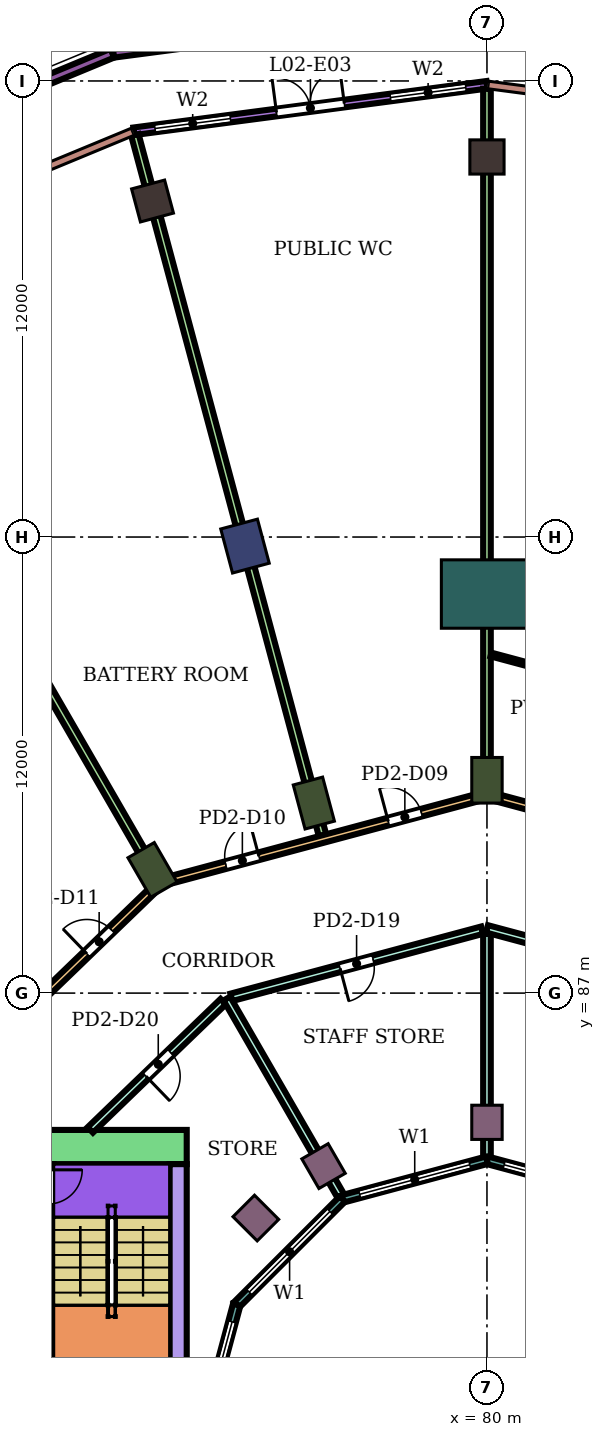
"""IFC4 building model, lengths in metres.
Left out: names, types, materials, properties, quantities, classifications, styles, units other than length and angle.
Written with IfcOpenShell. Run it as: python <this file> out.ifc"""

import sys

from ifc_helpers import new_model, si_unit, direction, frame, frame_2d, origin, origin_2d, place, context, subcontext, project, spatial, rectangle, extrude, element, fill, save


model = new_model("IFC4")
c1 = context("Model", 3, precision=1e-05, world=origin(), true_north=direction((0.0, 1.0)))
c2 = subcontext(c1, "Body", "Model", "MODEL_VIEW")
j1 = project(units=[si_unit("LENGTHUNIT", "METRE"), si_unit("PLANEANGLEUNIT", "RADIAN")], contexts=[c1])
p1 = place(None, origin())
s1 = spatial("IfcSite", under=j1, at=p1, CompositionType="ELEMENT")
p2 = place(p1, origin())
s2 = spatial("IfcBuilding", under=s1, at=p2, CompositionType="ELEMENT")
p3 = place(p2, frame((0.0, 0.0, 12.4)))
s3 = spatial("IfcBuildingStorey", under=s2, at=p3, CompositionType="ELEMENT", Elevation=12.4)
for number, where, z_axis, x_axis in (
    (1, (80.0, 109.0, 0.0), (0.0, 0.0, 1.0), (0.0, 1.0, 0.0)),
    (2, (71.2, 107.842, 0.0), (0.0, 0.0, 1.0), (-0.259, 0.966, 0.0)),
):
    element("IfcColumn", number, at=place(p3, frame(where, z_axis=z_axis, x_axis=x_axis)), inside=s3, PredefinedType="COLUMN", context=c2, shape_type="SweptSolid", body=[
        extrude(rectangle(XDim=0.9, YDim=0.9, at=origin_2d()), origin(), (0.0, 0.0, 1.0), 5.4),
    ])
p4 = place(p3, frame((73.633, 98.762, 0.0), z_axis=(0.0, 0.0, 1.0), x_axis=(-0.258819045103, 0.965925826289, 0.0)))
e3 = element("IfcColumn", 3, at=p4, inside=s3, PredefinedType="COLUMN", context=c2, shape_type="SweptSolid", body=[
    extrude(rectangle(XDim=1.2, YDim=1.0, at=origin_2d()), origin(), (0.0, 0.0, 1.0), 5.4),
])
for number, where, z_axis, x_axis in (
    (4, (80.0, 92.6, 0.0), (0.0, 0.0, 1.0), (0.0, 1.0, 0.0)),
    (5, (75.445, 92.0, 0.0), (0.0, 0.0, 1.0), (-0.259, 0.966, 0.0)),
    (6, (71.2, 90.242, 0.0), (0.0, 0.0, 1.0), (-0.5, 0.866, 0.0)),
):
    element("IfcColumn", number, at=place(p3, frame(where, z_axis=z_axis, x_axis=x_axis)), inside=s3, PredefinedType="COLUMN", context=c2, shape_type="SweptSolid", body=[
        extrude(rectangle(XDim=1.2, YDim=0.8, at=origin_2d()), origin(), (0.0, 0.0, 1.0), 5.4),
    ])
for number, where, z_axis, x_axis in (
    (7, (80.0, 83.6, 0.0), (0.0, 0.0, 1.0), (0.0, 1.0, 0.0)),
    (8, (75.7, 82.448, 0.0), (0.0, 0.0, 1.0), (-0.5, 0.866, 0.0)),
    (9, (73.919, 81.081, 0.0), (0.0, 0.0, 1.0), (-0.707, 0.707, 0.0)),
):
    element("IfcColumn", number, at=place(p3, frame(where, z_axis=z_axis, x_axis=x_axis)), inside=s3, PredefinedType="COLUMN", context=c2, shape_type="SweptSolid", body=[
        extrude(rectangle(XDim=0.9, YDim=0.8, at=origin_2d()), origin(), (0.0, 0.0, 1.0), 5.4),
    ])
p5 = place(p3, frame((80.0, 97.5, 0.0), z_axis=(0.0, 0.0, 1.0), x_axis=(0.0, 1.0, 0.0)))
e10 = element("IfcColumn", 10, at=p5, inside=s3, PredefinedType="COLUMN", context=c2, shape_type="SweptSolid", body=[
    extrude(rectangle(XDim=1.8, YDim=2.4, at=origin_2d()), origin(), (0.0, 0.0, 1.0), 5.4),
])
p6 = place(p3, frame((72.1, 82.95, 0.0), z_axis=(0.0, 0.0, 1.0), x_axis=(-1.0, 0.0, 0.0)))
e11 = element("IfcWall", 11, at=p6, inside=s3, PredefinedType="SHEAR", context=c2, shape_type="SweptSolid", body=[
    extrude(rectangle(XDim=14.6, YDim=0.9, at=frame_2d((7.3, 0.0))), origin(), (0.0, 0.0, 1.0), 4.95),
])
p7 = place(p6, frame((4.2, 0.0, 0.0)))
e12 = element("IfcOpeningElement", 12, at=p7, cuts=e11, PredefinedType="OPENING", context=c2, shape_type="SweptSolid", body=[
    extrude(rectangle(XDim=2.4, YDim=2.4, at=frame_2d((1.2, 1.2))), frame((0.0, 0.46, 0.0), z_axis=(0.0, -1.0, 0.0), x_axis=(1.0, 0.0, 0.0)), (0.0, 0.0, 1.0), 0.92),
])
p8 = place(p3, frame((71.875, 82.5, 0.0), z_axis=(0.0, 0.0, 1.0), x_axis=(0.0, -1.0, 0.0)))
e13 = element("IfcWall", 13, at=p8, inside=s3, PredefinedType="SHEAR", context=c2, shape_type="SweptSolid", body=[
    extrude(rectangle(XDim=7.5, YDim=0.45, at=frame_2d((3.75, 0.0))), origin(), (0.0, 0.0, 1.0), 4.95),
])
p9 = place(p3, frame((68.45, 82.5, 0.0), z_axis=(0.0, 0.0, 1.0), x_axis=(0.0, -1.0, 0.0)))
e14 = element("IfcWall", 14, at=p9, inside=s3, PredefinedType="SHEAR", context=c2, shape_type="SweptSolid", body=[
    extrude(rectangle(XDim=7.5, YDim=0.3, at=frame_2d((3.75, 0.0))), origin(), (0.0, 0.0, 1.0), 4.95),
])
p10 = place(p9, frame((0.15, 0.0, 0.0)))
e15 = element("IfcOpeningElement", 15, at=p10, cuts=e14, PredefinedType="OPENING", context=c2, shape_type="SweptSolid", body=[
    extrude(rectangle(XDim=0.9, YDim=2.1, at=frame_2d((0.45, 1.05))), frame((0.0, 0.16, 0.0), z_axis=(0.0, -1.0, 0.0), x_axis=(1.0, 0.0, 0.0)), (0.0, 0.0, 1.0), 0.32),
])
p11 = place(p3, frame((80.0, 110.899, 0.0), z_axis=(0.0, 0.0, 1.0), x_axis=(-0.99144586971, -0.130518532918, 0.0)))
e16 = element("IfcWall", 16, at=p11, inside=s3, PredefinedType="NOTDEFINED", context=c2, shape_type="SweptSolid", body=[
    extrude(rectangle(XDim=9.371, YDim=0.2, at=frame_2d((4.686, 0.0))), origin(), (0.0, 0.0, 1.0), 5.4),
])
p12 = place(p11, frame((0.562, 0.0, 0.9)))
e17 = element("IfcOpeningElement", 17, at=p12, cuts=e16, PredefinedType="OPENING", context=c2, shape_type="SweptSolid", body=[
    extrude(rectangle(XDim=2.0, YDim=2.4, at=frame_2d((1.0, 1.2))), frame((0.0, 0.11, 0.0), z_axis=(0.0, -1.0, 0.0), x_axis=(1.0, 0.0, 0.0)), (0.0, 0.0, 1.0), 0.22),
])
p13 = place(p11, frame((3.786, 0.0, 0.0)))
e18 = element("IfcOpeningElement", 18, at=p13, cuts=e16, PredefinedType="OPENING", context=c2, shape_type="SweptSolid", body=[
    extrude(rectangle(XDim=1.8, YDim=2.4, at=frame_2d((0.9, 1.2))), frame((0.0, 0.11, 0.0), z_axis=(0.0, -1.0, 0.0), x_axis=(1.0, 0.0, 0.0)), (0.0, 0.0, 1.0), 0.22),
])
p14 = place(p11, frame((6.81, 0.0, 0.9)))
e19 = element("IfcOpeningElement", 19, at=p14, cuts=e16, PredefinedType="OPENING", context=c2, shape_type="SweptSolid", body=[
    extrude(rectangle(XDim=2.0, YDim=2.4, at=frame_2d((1.0, 1.2))), frame((0.0, 0.11, 0.0), z_axis=(0.0, -1.0, 0.0), x_axis=(1.0, 0.0, 0.0)), (0.0, 0.0, 1.0), 0.22),
])
p15 = place(p3, frame((83.802, 81.585, 0.0), z_axis=(0.0, 0.0, 1.0), x_axis=(-0.965933654434, 0.258789828301, 0.0)))
e20 = element("IfcWall", 20, at=p15, inside=s3, PredefinedType="NOTDEFINED", context=c2, shape_type="SweptSolid", body=[
    extrude(rectangle(XDim=3.936, YDim=0.2, at=frame_2d((1.968, 0.0))), origin(), (0.0, 0.0, 1.0), 5.4),
])
p16 = place(p15, frame((0.468, 0.0, 0.9)))
e21 = element("IfcOpeningElement", 21, at=p16, cuts=e20, PredefinedType="OPENING", context=c2, shape_type="SweptSolid", body=[
    extrude(rectangle(XDim=3.0, YDim=2.3, at=frame_2d((1.5, 1.15))), frame((0.0, 0.11, 0.0), z_axis=(0.0, -1.0, 0.0), x_axis=(1.0, 0.0, 0.0)), (0.0, 0.0, 1.0), 0.22),
])
p17 = place(p3, frame((80.0, 82.604, 0.0), z_axis=(0.0, 0.0, 1.0), x_axis=(-0.965933654434, -0.258789828301, 0.0)))
e22 = element("IfcWall", 22, at=p17, inside=s3, PredefinedType="NOTDEFINED", context=c2, shape_type="SweptSolid", body=[
    extrude(rectangle(XDim=3.936, YDim=0.2, at=frame_2d((1.968, 0.0))), origin(), (0.0, 0.0, 1.0), 5.4),
])
p18 = place(p17, frame((0.468, 0.0, 0.9)))
e23 = element("IfcOpeningElement", 23, at=p18, cuts=e22, PredefinedType="OPENING", context=c2, shape_type="SweptSolid", body=[
    extrude(rectangle(XDim=3.0, YDim=2.3, at=frame_2d((1.5, 1.15))), frame((0.0, 0.11, 0.0), z_axis=(0.0, -1.0, 0.0), x_axis=(1.0, 0.0, 0.0)), (0.0, 0.0, 1.0), 0.22),
])
p19 = place(p3, frame((76.198, 81.585, 0.0), z_axis=(0.0, 0.0, 1.0), x_axis=(-0.707106781187, -0.707106781187, 0.0)))
e24 = element("IfcWall", 24, at=p19, inside=s3, PredefinedType="NOTDEFINED", context=c2, shape_type="SweptSolid", body=[
    extrude(rectangle(XDim=3.936, YDim=0.2, at=frame_2d((1.968, 0.0))), origin(), (0.0, 0.0, 1.0), 5.4),
])
p20 = place(p19, frame((0.468, 0.0, 0.9)))
e25 = element("IfcOpeningElement", 25, at=p20, cuts=e24, PredefinedType="OPENING", context=c2, shape_type="SweptSolid", body=[
    extrude(rectangle(XDim=3.0, YDim=2.3, at=frame_2d((1.5, 1.15))), frame((0.0, 0.11, 0.0), z_axis=(0.0, -1.0, 0.0), x_axis=(1.0, 0.0, 0.0)), (0.0, 0.0, 1.0), 0.22),
])
p21 = place(p3, frame((73.415, 78.802, 0.0), z_axis=(0.0, 0.0, 1.0), x_axis=(-0.258789828301, -0.965933654434, 0.0)))
e26 = element("IfcWall", 26, at=p21, inside=s3, PredefinedType="NOTDEFINED", context=c2, shape_type="SweptSolid", body=[
    extrude(rectangle(XDim=3.936, YDim=0.2, at=frame_2d((1.968, 0.0))), origin(), (0.0, 0.0, 1.0), 5.4),
])
p22 = place(p21, frame((0.468, 0.0, 0.9)))
e27 = element("IfcOpeningElement", 27, at=p22, cuts=e26, PredefinedType="OPENING", context=c2, shape_type="SweptSolid", body=[
    extrude(rectangle(XDim=3.0, YDim=2.3, at=frame_2d((1.5, 1.15))), frame((0.0, 0.11, 0.0), z_axis=(0.0, -1.0, 0.0), x_axis=(1.0, 0.0, 0.0)), (0.0, 0.0, 1.0), 0.22),
])
p23 = place(p3, frame((59.664, 110.25, 0.0), z_axis=(0.0, 0.0, 1.0), x_axis=(0.923876443197, 0.382690890544, 0.0)))
e28 = element("IfcWall", 28, at=p23, inside=s3, PredefinedType="PARAPET", context=c2, shape_type="SweptSolid", body=[
    extrude(rectangle(XDim=10.598, YDim=0.2, at=frame_2d((5.299, 0.0))), origin(), (0.0, 0.0, 1.0), 1.1),
])
p24 = place(p3, frame((80.0, 113.032, 0.0), z_axis=(0.0, 0.0, 1.0), x_axis=(0.991442554551, -0.130543713086, 0.0)))
e29 = element("IfcWall", 29, at=p24, inside=s3, PredefinedType="USERDEFINED", context=c2, shape_type="SweptSolid", body=[
    extrude(rectangle(XDim=9.912, YDim=0.25, at=frame_2d((4.956, 0.0))), origin(), (0.0, 0.0, 1.0), 0.6),
])
p25 = place(p3, frame((60.999, 107.943, 0.0), z_axis=(0.0, 0.0, 1.0), x_axis=(0.923880014619, 0.382682268453, 0.0)))
e30 = element("IfcWall", 30, at=p25, inside=s3, PredefinedType="USERDEFINED", context=c2, shape_type="SweptSolid", body=[
    extrude(rectangle(XDim=9.896, YDim=0.25, at=frame_2d((4.948, 0.0))), origin(), (0.0, 0.0, 1.0), 0.6),
])
p26 = place(p3, frame((70.173, 111.739, 0.0), z_axis=(0.0, 0.0, 1.0), x_axis=(0.991440911418, 0.130556191609, 0.0)))
e31 = element("IfcWall", 31, at=p26, inside=s3, PredefinedType="USERDEFINED", context=c2, shape_type="SweptSolid", body=[
    extrude(rectangle(XDim=4.348, YDim=0.25, at=frame_2d((2.174, 0.0))), origin(), (0.0, 0.0, 1.0), 0.6),
])
p27 = place(p3, frame((62.102, 106.003, 0.0), z_axis=(0.0, 0.0, 1.0), x_axis=(0.499973437523, -0.866040739095, 0.0)))
e32 = element("IfcWall", 32, at=p27, inside=s3, PredefinedType="PARTITIONING", context=c2, shape_type="SweptSolid", body=[
    extrude(rectangle(XDim=18.497, YDim=0.2, at=frame_2d((9.248, 0.0))), origin(), (0.0, 0.0, 1.0), 3.75),
])
p28 = place(p3, frame((66.22, 84.9, 0.0), z_axis=(0.0, 0.0, 1.0), x_axis=(0.719621348931, 0.694366700068, 0.0)))
e33 = element("IfcWall", 33, at=p28, inside=s3, PredefinedType="PARTITIONING", context=c2, shape_type="SweptSolid", body=[
    extrude(rectangle(XDim=7.173, YDim=0.2, at=frame_2d((3.586, 0.0))), origin(), (0.0, 0.0, 1.0), 4.45),
])
p29 = place(p28, frame((4.519, 0.0, 0.0)))
e34 = element("IfcOpeningElement", 34, at=p29, cuts=e33, PredefinedType="OPENING", context=c2, shape_type="SweptSolid", body=[
    extrude(rectangle(XDim=0.9, YDim=2.1, at=frame_2d((0.45, 1.05))), frame((0.0, 0.11, 0.0), z_axis=(0.0, -1.0, 0.0), x_axis=(1.0, 0.0, 0.0)), (0.0, 0.0, 1.0), 0.22),
])
p30 = place(p28, frame((0.932, 0.0, 0.0)))
e35 = element("IfcOpeningElement", 35, at=p30, cuts=e33, PredefinedType="OPENING", context=c2, shape_type="SweptSolid", body=[
    extrude(rectangle(XDim=0.9, YDim=2.1, at=frame_2d((0.45, 1.05))), frame((0.0, 0.11, 0.0), z_axis=(0.0, -1.0, 0.0), x_axis=(1.0, 0.0, 0.0)), (0.0, 0.0, 1.0), 0.22),
])
p31 = place(p3, frame((69.563, 83.4, 0.0), z_axis=(0.0, 0.0, 1.0), x_axis=(0.719454254864, 0.694539829785, 0.0)))
e36 = element("IfcWall", 36, at=p31, inside=s3, PredefinedType="PARTITIONING", context=c2, shape_type="SweptSolid", body=[
    extrude(rectangle(XDim=4.86, YDim=0.2, at=frame_2d((2.43, 0.0))), origin(), (0.0, 0.0, 1.0), 4.95),
])
p32 = place(p31, frame((2.035, 0.0, 0.0)))
e37 = element("IfcOpeningElement", 37, at=p32, cuts=e36, PredefinedType="OPENING", context=c2, shape_type="SweptSolid", body=[
    extrude(rectangle(XDim=0.9, YDim=2.1, at=frame_2d((0.45, 1.05))), frame((0.0, 0.11, 0.0), z_axis=(0.0, -1.0, 0.0), x_axis=(1.0, 0.0, 0.0)), (0.0, 0.0, 1.0), 0.22),
])
p33 = place(p3, frame((70.737, 109.579, 0.0), z_axis=(0.0, 0.0, 1.0), x_axis=(0.258776177531, -0.965937311601, 0.0)))
e38 = element("IfcWall", 38, at=p33, inside=s3, PredefinedType="PARTITIONING", context=c2, shape_type="SweptSolid", body=[
    extrude(rectangle(XDim=19.074, YDim=0.2, at=frame_2d((9.537, 0.0))), origin(), (0.0, 0.0, 1.0), 3.75),
])
p34 = place(p3, frame((71.411, 89.908, 0.0), z_axis=(0.0, 0.0, 1.0), x_axis=(0.965907314361, 0.258888122678, 0.0)))
e39 = element("IfcWall", 39, at=p34, inside=s3, PredefinedType="PARTITIONING", context=c2, shape_type="SweptSolid", body=[
    extrude(rectangle(XDim=8.802, YDim=0.2, at=frame_2d((4.401, 0.0))), origin(), (0.0, 0.0, 1.0), 4.45),
])
p35 = place(p34, frame((6.205, 0.0, 0.0)))
e40 = element("IfcOpeningElement", 40, at=p35, cuts=e39, PredefinedType="OPENING", context=c2, shape_type="SweptSolid", body=[
    extrude(rectangle(XDim=0.9, YDim=2.1, at=frame_2d((0.45, 1.05))), frame((0.0, 0.11, 0.0), z_axis=(0.0, -1.0, 0.0), x_axis=(1.0, 0.0, 0.0)), (0.0, 0.0, 1.0), 0.22),
])
p36 = place(p34, frame((1.779, 0.0, 0.0)))
e41 = element("IfcOpeningElement", 41, at=p36, cuts=e39, PredefinedType="OPENING", context=c2, shape_type="SweptSolid", body=[
    extrude(rectangle(XDim=0.9, YDim=2.1, at=frame_2d((0.45, 1.05))), frame((0.0, 0.11, 0.0), z_axis=(0.0, -1.0, 0.0), x_axis=(1.0, 0.0, 0.0)), (0.0, 0.0, 1.0), 0.22),
])
p37 = place(p3, frame((73.274, 86.888, 0.0), z_axis=(0.0, 0.0, 1.0), x_axis=(0.965941353683, 0.258761089124, 0.0)))
e42 = element("IfcWall", 42, at=p37, inside=s3, PredefinedType="PARTITIONING", context=c2, shape_type="SweptSolid", body=[
    extrude(rectangle(XDim=6.833, YDim=0.2, at=frame_2d((3.417, 0.0))), origin(), (0.0, 0.0, 1.0), 4.95),
])
p38 = place(p37, frame((2.961, 0.0, 0.0)))
e43 = element("IfcOpeningElement", 43, at=p38, cuts=e42, PredefinedType="OPENING", context=c2, shape_type="SweptSolid", body=[
    extrude(rectangle(XDim=0.9, YDim=2.1, at=frame_2d((0.45, 1.05))), frame((0.0, 0.11, 0.0), z_axis=(0.0, -1.0, 0.0), x_axis=(1.0, 0.0, 0.0)), (0.0, 0.0, 1.0), 0.22),
])
p39 = place(p3, frame((73.155, 86.856, 0.0), z_axis=(0.0, 0.0, 1.0), x_axis=(0.499951716245, -0.866053278629, 0.0)))
e44 = element("IfcWall", 44, at=p39, inside=s3, PredefinedType="PARTITIONING", context=c2, shape_type="SweptSolid", body=[
    extrude(rectangle(XDim=5.992, YDim=0.2, at=frame_2d((2.996, 0.0))), origin(), (0.0, 0.0, 1.0), 4.95),
])
p40 = place(p3, frame((80.0, 82.699, 0.0), z_axis=(0.0, 0.0, 1.0), x_axis=(0.0, 1.0, 0.0)))
e45 = element("IfcWall", 45, at=p40, inside=s3, PredefinedType="PARTITIONING", context=c2, shape_type="SweptSolid", body=[
    extrude(rectangle(XDim=5.861, YDim=0.2, at=frame_2d((2.931, 0.0))), origin(), (0.0, 0.0, 1.0), 4.95),
])
p41 = place(p3, frame((80.0, 88.69, 0.0), z_axis=(0.0, 0.0, 1.0), x_axis=(0.965929896633, -0.258803853893, 0.0)))
e46 = element("IfcWall", 46, at=p41, inside=s3, PredefinedType="PARTITIONING", context=c2, shape_type="SweptSolid", body=[
    extrude(rectangle(XDim=6.963, YDim=0.2, at=frame_2d((3.481, 0.0))), origin(), (0.0, 0.0, 1.0), 4.95),
])
p42 = place(p41, frame((3.102, 0.0, 0.0)))
e47 = element("IfcOpeningElement", 47, at=p42, cuts=e46, PredefinedType="OPENING", context=c2, shape_type="SweptSolid", body=[
    extrude(rectangle(XDim=0.9, YDim=2.1, at=frame_2d((0.45, 1.05))), frame((0.0, 0.11, 0.0), z_axis=(0.0, -1.0, 0.0), x_axis=(1.0, 0.0, 0.0)), (0.0, 0.0, 1.0), 0.22),
])
p43 = place(p3, frame((80.0, 92.3, 0.0), z_axis=(0.0, 0.0, 1.0), x_axis=(0.0, 1.0, 0.0)))
e48 = element("IfcWall", 48, at=p43, inside=s3, PredefinedType="PARTITIONING", context=c2, shape_type="SweptSolid", body=[
    extrude(rectangle(XDim=18.498, YDim=0.2, at=frame_2d((9.249, 0.0))), origin(), (0.0, 0.0, 1.0), 3.75),
])
p44 = place(p3, frame((80.0, 92.21, 0.0), z_axis=(0.0, 0.0, 1.0), x_axis=(0.965910452724, -0.258876413213, 0.0)))
e49 = element("IfcWall", 49, at=p44, inside=s3, PredefinedType="PARTITIONING", context=c2, shape_type="SweptSolid", body=[
    extrude(rectangle(XDim=8.812, YDim=0.2, at=frame_2d((4.406, 0.0))), origin(), (0.0, 0.0, 1.0), 4.45),
])
p45 = place(p44, frame((6.213, 0.0, 0.0)))
e50 = element("IfcOpeningElement", 50, at=p45, cuts=e49, PredefinedType="OPENING", context=c2, shape_type="SweptSolid", body=[
    extrude(rectangle(XDim=0.9, YDim=2.1, at=frame_2d((0.45, 1.05))), frame((0.0, 0.11, 0.0), z_axis=(0.0, -1.0, 0.0), x_axis=(1.0, 0.0, 0.0)), (0.0, 0.0, 1.0), 0.22),
])
p46 = place(p44, frame((1.787, 0.0, 0.0)))
e51 = element("IfcOpeningElement", 51, at=p46, cuts=e49, PredefinedType="OPENING", context=c2, shape_type="SweptSolid", body=[
    extrude(rectangle(XDim=0.9, YDim=2.1, at=frame_2d((0.45, 1.05))), frame((0.0, 0.11, 0.0), z_axis=(0.0, -1.0, 0.0), x_axis=(1.0, 0.0, 0.0)), (0.0, 0.0, 1.0), 0.22),
])
p47 = place(p3, frame((80.106, 95.908, 0.0), z_axis=(0.0, 0.0, 1.0), x_axis=(0.965909758842, -0.258879002188, 0.0)))
e52 = element("IfcWall", 52, at=p47, inside=s3, PredefinedType="PARTITIONING", context=c2, shape_type="SweptSolid", body=[
    extrude(rectangle(XDim=5.208, YDim=0.1, at=frame_2d((2.604, 0.0))), origin(), (0.0, 0.0, 1.0), 4.95),
])
p48 = place(p47, frame((2.149, 0.0, 0.0)))
e53 = element("IfcOpeningElement", 53, at=p48, cuts=e52, PredefinedType="OPENING", context=c2, shape_type="SweptSolid", body=[
    extrude(rectangle(XDim=0.9, YDim=2.1, at=frame_2d((0.45, 1.05))), frame((0.0, 0.06, 0.0), z_axis=(0.0, -1.0, 0.0), x_axis=(1.0, 0.0, 0.0)), (0.0, 0.0, 1.0), 0.12),
])
p49 = place(p12, origin())
e54 = element("IfcWindow", 54, at=p49, inside=s3, PartitioningType="SINGLE_PANEL", PredefinedType="WINDOW", context=c2, shape_type="SweptSolid", body=[
    extrude(rectangle(XDim=2.0, YDim=2.4, at=frame_2d((1.0, 1.2))), frame((0.0, 0.03, 0.0), z_axis=(0.0, -1.0, 0.0), x_axis=(1.0, 0.0, 0.0)), (0.0, 0.0, 1.0), 0.06),
])
fill(e17, e54)
p50 = place(p13, frame((1.8, 0.0, 0.0), z_axis=(0.0, 0.0, 1.0), x_axis=(-1.0, 0.0, 0.0)))
e55 = element("IfcDoor", 55, at=p50, inside=s3, OperationType="DOUBLE_DOOR_SINGLE_SWING", PredefinedType="DOOR", context=c2, shape_type="SweptSolid", body=[
    extrude(rectangle(XDim=1.8, YDim=2.4, at=frame_2d((0.9, 1.2))), frame((0.0, 0.025, 0.0), z_axis=(0.0, -1.0, 0.0), x_axis=(1.0, 0.0, 0.0)), (0.0, 0.0, 1.0), 0.05),
])
fill(e18, e55)
p51 = place(p14, origin())
e56 = element("IfcWindow", 56, at=p51, inside=s3, PartitioningType="SINGLE_PANEL", PredefinedType="WINDOW", context=c2, shape_type="SweptSolid", body=[
    extrude(rectangle(XDim=2.0, YDim=2.4, at=frame_2d((1.0, 1.2))), frame((0.0, 0.03, 0.0), z_axis=(0.0, -1.0, 0.0), x_axis=(1.0, 0.0, 0.0)), (0.0, 0.0, 1.0), 0.06),
])
fill(e19, e56)
p52 = place(p16, origin())
e57 = element("IfcWindow", 57, at=p52, inside=s3, PartitioningType="SINGLE_PANEL", PredefinedType="WINDOW", context=c2, shape_type="SweptSolid", body=[
    extrude(rectangle(XDim=3.0, YDim=2.3, at=frame_2d((1.5, 1.15))), frame((0.0, 0.03, 0.0), z_axis=(0.0, -1.0, 0.0), x_axis=(1.0, 0.0, 0.0)), (0.0, 0.0, 1.0), 0.06),
])
fill(e21, e57)
p53 = place(p18, origin())
e58 = element("IfcWindow", 58, at=p53, inside=s3, PartitioningType="SINGLE_PANEL", PredefinedType="WINDOW", context=c2, shape_type="SweptSolid", body=[
    extrude(rectangle(XDim=3.0, YDim=2.3, at=frame_2d((1.5, 1.15))), frame((0.0, 0.03, 0.0), z_axis=(0.0, -1.0, 0.0), x_axis=(1.0, 0.0, 0.0)), (0.0, 0.0, 1.0), 0.06),
])
fill(e23, e58)
p54 = place(p20, origin())
e59 = element("IfcWindow", 59, at=p54, inside=s3, PartitioningType="SINGLE_PANEL", PredefinedType="WINDOW", context=c2, shape_type="SweptSolid", body=[
    extrude(rectangle(XDim=3.0, YDim=2.3, at=frame_2d((1.5, 1.15))), frame((0.0, 0.03, 0.0), z_axis=(0.0, -1.0, 0.0), x_axis=(1.0, 0.0, 0.0)), (0.0, 0.0, 1.0), 0.06),
])
fill(e25, e59)
p55 = place(p22, origin())
e60 = element("IfcWindow", 60, at=p55, inside=s3, PartitioningType="SINGLE_PANEL", PredefinedType="WINDOW", context=c2, shape_type="SweptSolid", body=[
    extrude(rectangle(XDim=3.0, YDim=2.3, at=frame_2d((1.5, 1.15))), frame((0.0, 0.03, 0.0), z_axis=(0.0, -1.0, 0.0), x_axis=(1.0, 0.0, 0.0)), (0.0, 0.0, 1.0), 0.06),
])
fill(e27, e60)
p56 = place(p35, origin())
e61 = element("IfcDoor", 61, at=p56, inside=s3, OperationType="SINGLE_SWING_LEFT", PredefinedType="DOOR", context=c2, shape_type="SweptSolid", body=[
    extrude(rectangle(XDim=0.9, YDim=2.1, at=frame_2d((0.45, 1.05))), frame((0.0, 0.025, 0.0), z_axis=(0.0, -1.0, 0.0), x_axis=(1.0, 0.0, 0.0)), (0.0, 0.0, 1.0), 0.05),
])
fill(e40, e61)
p57 = place(p36, origin())
e62 = element("IfcDoor", 62, at=p57, inside=s3, OperationType="SINGLE_SWING_RIGHT", PredefinedType="DOOR", context=c2, shape_type="SweptSolid", body=[
    extrude(rectangle(XDim=0.9, YDim=2.1, at=frame_2d((0.45, 1.05))), frame((0.0, 0.025, 0.0), z_axis=(0.0, -1.0, 0.0), x_axis=(1.0, 0.0, 0.0)), (0.0, 0.0, 1.0), 0.05),
])
fill(e41, e62)
p58 = place(p29, origin())
e63 = element("IfcDoor", 63, at=p58, inside=s3, OperationType="SINGLE_SWING_LEFT", PredefinedType="DOOR", context=c2, shape_type="SweptSolid", body=[
    extrude(rectangle(XDim=0.9, YDim=2.1, at=frame_2d((0.45, 1.05))), frame((0.0, 0.025, 0.0), z_axis=(0.0, -1.0, 0.0), x_axis=(1.0, 0.0, 0.0)), (0.0, 0.0, 1.0), 0.05),
])
fill(e34, e63)
p59 = place(p38, frame((0.9, 0.0, 0.0), z_axis=(0.0, 0.0, 1.0), x_axis=(-1.0, 0.0, 0.0)))
e64 = element("IfcDoor", 64, at=p59, inside=s3, OperationType="SINGLE_SWING_RIGHT", PredefinedType="DOOR", context=c2, shape_type="SweptSolid", body=[
    extrude(rectangle(XDim=0.9, YDim=2.1, at=frame_2d((0.45, 1.05))), frame((0.0, 0.025, 0.0), z_axis=(0.0, -1.0, 0.0), x_axis=(1.0, 0.0, 0.0)), (0.0, 0.0, 1.0), 0.05),
])
fill(e43, e64)
p60 = place(p32, frame((0.9, 0.0, 0.0), z_axis=(0.0, 0.0, 1.0), x_axis=(-1.0, 0.0, 0.0)))
e65 = element("IfcDoor", 65, at=p60, inside=s3, OperationType="SINGLE_SWING_RIGHT", PredefinedType="DOOR", context=c2, shape_type="SweptSolid", body=[
    extrude(rectangle(XDim=0.9, YDim=2.1, at=frame_2d((0.45, 1.05))), frame((0.0, 0.025, 0.0), z_axis=(0.0, -1.0, 0.0), x_axis=(1.0, 0.0, 0.0)), (0.0, 0.0, 1.0), 0.05),
])
fill(e37, e65)
save(model, sys.argv[1])
